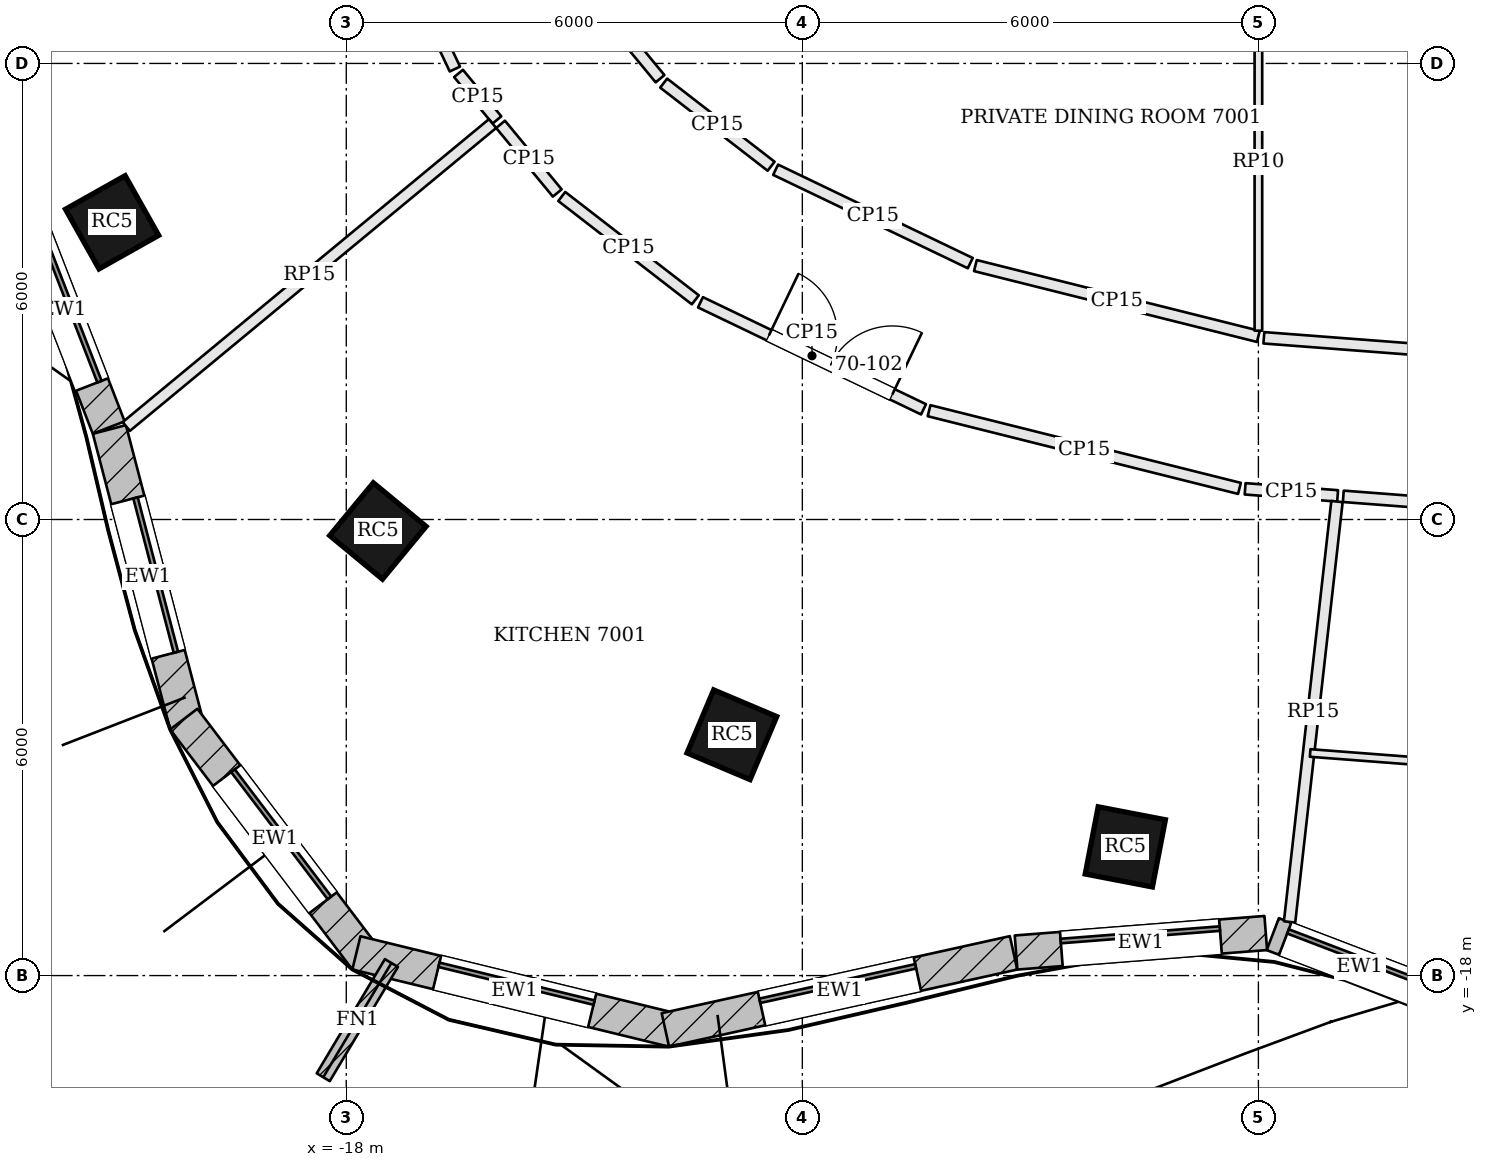
"""IFC4 building model, lengths in metres.
Left out: names, types, materials, properties, quantities, classifications, styles, units other than length and angle.
Written with IfcOpenShell. Run it as: python <this file> out.ifc"""

import sys

from ifc_helpers import new_model, si_unit, direction, frame, frame_2d, origin, origin_2d, place, context, subcontext, project, spatial, rectangle, extrude, element, fill, save


model = new_model("IFC4")
c1 = context("Model", 3, precision=1e-05, world=origin(), true_north=direction((0.0, 1.0)))
c2 = subcontext(c1, "Body", "Model", "MODEL_VIEW")
j1 = project(units=[si_unit("LENGTHUNIT", "METRE"), si_unit("PLANEANGLEUNIT", "RADIAN")], contexts=[c1])
p1 = place(None, origin())
s1 = spatial("IfcSite", under=j1, at=p1, CompositionType="ELEMENT")
p2 = place(p1, origin())
s2 = spatial("IfcBuilding", under=s1, at=p2, CompositionType="ELEMENT")
p3 = place(p2, frame((0.0, 0.0, 284.4)))
s3 = spatial("IfcBuildingStorey", under=s2, at=p3, CompositionType="ELEMENT", Elevation=284.4)
for number, where, z_axis, x_axis in (
    (1, (-21.081, -8.09, 0.0), (0.0, 0.0, 1.0), (0.49, -0.872, 0.0)),
    (2, (-17.584, -12.151, 0.0), (0.0, 0.0, 1.0), (0.771, -0.637, 0.0)),
    (3, (-12.927, -14.832, 0.0), (0.0, 0.0, 1.0), (0.921, -0.389, 0.0)),
    (4, (-7.751, -16.307, 0.0), (0.0, 0.0, 1.0), (0.982, -0.189, 0.0)),
):
    element("IfcColumn", number, at=place(p3, frame(where, z_axis=z_axis, x_axis=x_axis)), inside=s3, PredefinedType="COLUMN", context=c2, shape_type="SweptSolid", body=[
        extrude(rectangle(XDim=0.9, YDim=0.9, at=origin_2d()), origin(), (0.0, 0.0, 1.0), 3.9),
    ])
p4 = place(p3, frame((-22.323, -7.701, 0.0), z_axis=(0.0, 0.0, 1.0), x_axis=(0.361550075906, -0.932352692178, 0.0)))
e5 = element("IfcWall", 5, at=p4, inside=s3, PredefinedType="SOLIDWALL", context=c2, shape_type="SweptSolid", body=[
    extrude(rectangle(XDim=3.313, YDim=0.45, at=frame_2d((1.657, 0.0))), origin(), (0.0, 0.0, 1.0), 3.7),
])
p5 = place(p4, frame((0.607, 0.0, 0.9)))
e6 = element("IfcOpeningElement", 6, at=p5, cuts=e5, PredefinedType="OPENING", context=c2, shape_type="SweptSolid", body=[
    extrude(rectangle(XDim=2.1, YDim=2.3, at=frame_2d((1.05, 1.15))), frame((0.0, 0.235, 0.0), z_axis=(0.0, -1.0, 0.0), x_axis=(1.0, 0.0, 0.0)), (0.0, 0.0, 1.0), 0.47),
])
p6 = place(p3, frame((-21.117, -10.815, 0.0), z_axis=(0.0, 0.0, 1.0), x_axis=(0.253065392985, -0.967449175344, 0.0)))
e7 = element("IfcWall", 7, at=p6, inside=s3, PredefinedType="SOLIDWALL", context=c2, shape_type="SweptSolid", body=[
    extrude(rectangle(XDim=4.015, YDim=0.45, at=frame_2d((2.008, 0.0))), origin(), (0.0, 0.0, 1.0), 3.7),
])
p7 = place(p6, frame((0.958, 0.0, 0.9)))
e8 = element("IfcOpeningElement", 8, at=p7, cuts=e7, PredefinedType="OPENING", context=c2, shape_type="SweptSolid", body=[
    extrude(rectangle(XDim=2.1, YDim=2.3, at=frame_2d((1.05, 1.15))), frame((0.0, 0.235, 0.0), z_axis=(0.0, -1.0, 0.0), x_axis=(1.0, 0.0, 0.0)), (0.0, 0.0, 1.0), 0.47),
])
p8 = place(p3, frame((-20.138, -14.626, 0.0), z_axis=(0.0, 0.0, 1.0), x_axis=(0.604591324894, -0.796535830872, 0.0)))
e9 = element("IfcWall", 9, at=p8, inside=s3, PredefinedType="SOLIDWALL", context=c2, shape_type="SweptSolid", body=[
    extrude(rectangle(XDim=3.965, YDim=0.45, at=frame_2d((1.982, 0.0))), origin(), (0.0, 0.0, 1.0), 3.7),
])
p9 = place(p8, frame((0.932, 0.0, 0.9)))
e10 = element("IfcOpeningElement", 10, at=p9, cuts=e9, PredefinedType="OPENING", context=c2, shape_type="SweptSolid", body=[
    extrude(rectangle(XDim=2.1, YDim=2.3, at=frame_2d((1.05, 1.15))), frame((0.0, 0.235, 0.0), z_axis=(0.0, -1.0, 0.0), x_axis=(1.0, 0.0, 0.0)), (0.0, 0.0, 1.0), 0.47),
])
p10 = place(p3, frame((-17.867, -17.701, 0.0), z_axis=(0.0, 0.0, 1.0), x_axis=(0.971546885012, -0.236847314156, 0.0)))
e11 = element("IfcWall", 11, at=p10, inside=s3, PredefinedType="SOLIDWALL", context=c2, shape_type="SweptSolid", body=[
    extrude(rectangle(XDim=4.285, YDim=0.45, at=frame_2d((2.143, 0.0))), origin(), (0.0, 0.0, 1.0), 3.7),
])
p11 = place(p10, frame((1.093, 0.0, 0.9)))
e12 = element("IfcOpeningElement", 12, at=p11, cuts=e11, PredefinedType="OPENING", context=c2, shape_type="SweptSolid", body=[
    extrude(rectangle(XDim=2.1, YDim=2.3, at=frame_2d((1.05, 1.15))), frame((0.0, 0.235, 0.0), z_axis=(0.0, -1.0, 0.0), x_axis=(1.0, 0.0, 0.0)), (0.0, 0.0, 1.0), 0.47),
])
p12 = place(p3, frame((-13.802, -18.715, 0.0), z_axis=(0.0, 0.0, 1.0), x_axis=(0.976380129166, 0.216059814331, 0.0)))
e13 = element("IfcWall", 13, at=p12, inside=s3, PredefinedType="SOLIDWALL", context=c2, shape_type="SweptSolid", body=[
    extrude(rectangle(XDim=4.692, YDim=0.45, at=frame_2d((2.346, 0.0))), origin(), (0.0, 0.0, 1.0), 3.7),
])
p13 = place(p12, frame((1.296, 0.0, 0.9)))
e14 = element("IfcOpeningElement", 14, at=p13, cuts=e13, PredefinedType="OPENING", context=c2, shape_type="SweptSolid", body=[
    extrude(rectangle(XDim=2.1, YDim=2.3, at=frame_2d((1.05, 1.15))), frame((0.0, 0.235, 0.0), z_axis=(0.0, -1.0, 0.0), x_axis=(1.0, 0.0, 0.0)), (0.0, 0.0, 1.0), 0.47),
])
p14 = place(p3, frame((-9.188, -17.697, 0.0), z_axis=(0.0, 0.0, 1.0), x_axis=(0.996964028691, 0.077863505548, 0.0)))
e15 = element("IfcWall", 15, at=p14, inside=s3, PredefinedType="SOLIDWALL", context=c2, shape_type="SweptSolid", body=[
    extrude(rectangle(XDim=3.295, YDim=0.45, at=frame_2d((1.648, 0.0))), origin(), (0.0, 0.0, 1.0), 3.7),
])
p15 = place(p14, frame((0.598, 0.0, 0.9)))
e16 = element("IfcOpeningElement", 16, at=p15, cuts=e15, PredefinedType="OPENING", context=c2, shape_type="SweptSolid", body=[
    extrude(rectangle(XDim=2.1, YDim=2.3, at=frame_2d((1.05, 1.15))), frame((0.0, 0.235, 0.0), z_axis=(0.0, -1.0, 0.0), x_axis=(1.0, 0.0, 0.0)), (0.0, 0.0, 1.0), 0.47),
])
p16 = place(p3, frame((-5.811, -17.455, 0.0), z_axis=(0.0, 0.0, 1.0), x_axis=(0.934122271306, -0.35695319336, 0.0)))
e17 = element("IfcWall", 17, at=p16, inside=s3, PredefinedType="SOLIDWALL", context=c2, shape_type="SweptSolid", body=[
    extrude(rectangle(XDim=2.448, YDim=0.45, at=frame_2d((1.224, 0.0))), origin(), (0.0, 0.0, 1.0), 3.7),
])
p17 = place(p16, frame((0.174, 0.0, 0.9)))
e18 = element("IfcOpeningElement", 18, at=p17, cuts=e17, PredefinedType="OPENING", context=c2, shape_type="SweptSolid", body=[
    extrude(rectangle(XDim=2.1, YDim=2.3, at=frame_2d((1.05, 1.15))), frame((0.0, 0.235, 0.0), z_axis=(0.0, -1.0, 0.0), x_axis=(1.0, 0.0, 0.0)), (0.0, 0.0, 1.0), 0.47),
])
p18 = place(p3, frame((-17.406, -17.835, 0.0), z_axis=(0.0, 0.0, 1.0), x_axis=(-0.512648290506, -0.858598701514, 0.0)))
e19 = element("IfcWall", 19, at=p18, inside=s3, PredefinedType="SOLIDWALL", context=c2, shape_type="SweptSolid", body=[
    extrude(rectangle(XDim=1.75, YDim=0.2, at=frame_2d((0.875, 0.0))), origin(), (0.0, 0.0, 1.0), 3.7),
])
p19 = place(p3, frame((-17.425, -4.269, 0.0), z_axis=(0.0, 0.0, 1.0), x_axis=(0.427886578366, -0.90383243804, 0.0)))
e20 = element("IfcWall", 20, at=p19, inside=s3, PredefinedType="PARTITIONING", context=c2, shape_type="SweptSolid", body=[
    extrude(rectangle(XDim=1.996, YDim=0.15, at=frame_2d((0.998, 0.0))), origin(), (0.0, 0.0, 1.0), 3.198),
])
p20 = place(p3, frame((-16.523, -6.132, 0.0), z_axis=(0.0, 0.0, 1.0), x_axis=(0.636698606768, -0.771112757085, 0.0)))
e21 = element("IfcWall", 21, at=p20, inside=s3, PredefinedType="PARTITIONING", context=c2, shape_type="SweptSolid", body=[
    extrude(rectangle(XDim=0.794, YDim=0.15, at=frame_2d((0.397, 0.0))), origin(), (0.0, 0.0, 1.0), 3.198),
])
p21 = place(p3, frame((-20.894, -10.777, 0.0), z_axis=(0.0, 0.0, 1.0), x_axis=(0.770606553, 0.637311180251, 0.0)))
e22 = element("IfcWall", 22, at=p21, inside=s3, PredefinedType="PARTITIONING", context=c2, shape_type="SweptSolid", body=[
    extrude(rectangle(XDim=6.253, YDim=0.15, at=frame_2d((3.126, 0.0))), origin(), (0.0, 0.0, 1.0), 3.234),
])
p22 = place(p3, frame((-15.97, -6.802, 0.0), z_axis=(0.0, 0.0, 1.0), x_axis=(0.636897609689, -0.770948399552, 0.0)))
e23 = element("IfcWall", 23, at=p22, inside=s3, PredefinedType="PARTITIONING", context=c2, shape_type="SweptSolid", body=[
    extrude(rectangle(XDim=1.171, YDim=0.15, at=frame_2d((0.585, 0.0))), origin(), (0.0, 0.0, 1.0), 3.198),
])
p23 = place(p3, frame((-15.165, -7.75, 0.0), z_axis=(0.0, 0.0, 1.0), x_axis=(0.790917548929, -0.611922732701, 0.0)))
e24 = element("IfcWall", 24, at=p23, inside=s3, PredefinedType="PARTITIONING", context=c2, shape_type="SweptSolid", body=[
    extrude(rectangle(XDim=2.222, YDim=0.15, at=frame_2d((1.111, 0.0))), origin(), (0.0, 0.0, 1.0), 3.198),
])
p24 = place(p3, frame((-13.34, -9.142, 0.0), z_axis=(0.0, 0.0, 1.0), x_axis=(0.901599124721, -0.432572558425, 0.0)))
e25 = element("IfcWall", 25, at=p24, inside=s3, PredefinedType="PARTITIONING", context=c2, shape_type="SweptSolid", body=[
    extrude(rectangle(XDim=3.255, YDim=0.15, at=frame_2d((1.627, 0.0))), origin(), (0.0, 0.0, 1.0), 3.198),
])
p25 = place(p24, frame((1.0, 0.0, 0.0)))
e26 = element("IfcOpeningElement", 26, at=p25, cuts=e25, PredefinedType="OPENING", context=c2, shape_type="SweptSolid", body=[
    extrude(rectangle(XDim=1.8, YDim=2.1, at=frame_2d((0.9, 1.05))), frame((0.0, 0.085, 0.0), z_axis=(0.0, -1.0, 0.0), x_axis=(1.0, 0.0, 0.0)), (0.0, 0.0, 1.0), 0.17),
])
p26 = place(p3, frame((-10.333, -10.569, 0.0), z_axis=(0.0, 0.0, 1.0), x_axis=(0.970067398009, -0.242835836151, 0.0)))
e27 = element("IfcWall", 27, at=p26, inside=s3, PredefinedType="PARTITIONING", context=c2, shape_type="SweptSolid", body=[
    extrude(rectangle(XDim=4.209, YDim=0.15, at=frame_2d((2.105, 0.0))), origin(), (0.0, 0.0, 1.0), 3.198),
])
p27 = place(p3, frame((-6.175, -11.596, 0.0), z_axis=(0.0, 0.0, 1.0), x_axis=(0.997106038867, -0.076023333621, 0.0)))
e28 = element("IfcWall", 28, at=p27, inside=s3, PredefinedType="PARTITIONING", context=c2, shape_type="SweptSolid", body=[
    extrude(rectangle(XDim=1.22, YDim=0.15, at=frame_2d((0.61, 0.0))), origin(), (0.0, 0.0, 1.0), 3.198),
])
p28 = place(p3, frame((-5.59, -17.294, 0.0), z_axis=(0.0, 0.0, 1.0), x_axis=(0.112044411854, 0.993703200041, 0.0)))
e29 = element("IfcWall", 29, at=p28, inside=s3, PredefinedType="PARTITIONING", context=c2, shape_type="SweptSolid", body=[
    extrude(rectangle(XDim=5.565, YDim=0.15, at=frame_2d((2.783, 0.0))), origin(), (0.0, 0.0, 1.0), 3.234),
])
p29 = place(p3, frame((-4.883, -11.695, 0.0), z_axis=(0.0, 0.0, 1.0), x_axis=(0.997096936577, -0.076142623207, 0.0)))
e30 = element("IfcWall", 30, at=p29, inside=s3, PredefinedType="PARTITIONING", context=c2, shape_type="SweptSolid", body=[
    extrude(rectangle(XDim=3.944, YDim=0.15, at=frame_2d((1.972, 0.0))), origin(), (0.0, 0.0, 1.0), 3.198),
])
p30 = place(p29, frame((1.604, 0.0, 0.0)))
e31 = element("IfcOpeningElement", 31, at=p30, cuts=e30, PredefinedType="OPENING", context=c2, shape_type="SweptSolid", body=[
    extrude(rectangle(XDim=1.8, YDim=2.1, at=frame_2d((0.9, 1.05))), frame((0.0, 0.085, 0.0), z_axis=(0.0, -1.0, 0.0), x_axis=(1.0, 0.0, 0.0)), (0.0, 0.0, 1.0), 0.17),
])
p31 = place(p3, frame((-0.982, -9.987, 0.0), z_axis=(0.0, 0.0, 1.0), x_axis=(-0.997096607341, 0.07614693447, 0.0)))
e32 = element("IfcWall", 32, at=p31, inside=s3, PredefinedType="PARTITIONING", context=c2, shape_type="SweptSolid", body=[
    extrude(rectangle(XDim=4.96, YDim=0.15, at=frame_2d((2.48, 0.0))), origin(), (0.0, 0.0, 1.0), 3.198),
])
p32 = place(p3, frame((-6.001, -9.591, 0.0), z_axis=(0.0, 0.0, 1.0), x_axis=(-0.970063855769, 0.242849986061, 0.0)))
e33 = element("IfcWall", 33, at=p32, inside=s3, PredefinedType="PARTITIONING", context=c2, shape_type="SweptSolid", body=[
    extrude(rectangle(XDim=3.837, YDim=0.15, at=frame_2d((1.919, 0.0))), origin(), (0.0, 0.0, 1.0), 3.198),
])
p33 = place(p3, frame((-9.791, -8.627, 0.0), z_axis=(0.0, 0.0, 1.0), x_axis=(-0.901598165215, 0.432574558292, 0.0)))
e34 = element("IfcWall", 34, at=p33, inside=s3, PredefinedType="PARTITIONING", context=c2, shape_type="SweptSolid", body=[
    extrude(rectangle(XDim=2.84, YDim=0.15, at=frame_2d((1.42, 0.0))), origin(), (0.0, 0.0, 1.0), 3.198),
])
p34 = place(p3, frame((-12.411, -7.353, 0.0), z_axis=(0.0, 0.0, 1.0), x_axis=(-0.790894311556, 0.611952766109, 0.0)))
e35 = element("IfcWall", 35, at=p34, inside=s3, PredefinedType="PARTITIONING", context=c2, shape_type="SweptSolid", body=[
    extrude(rectangle(XDim=1.787, YDim=0.15, at=frame_2d((0.894, 0.0))), origin(), (0.0, 0.0, 1.0), 3.198),
])
p35 = place(p3, frame((-13.872, -6.201, 0.0), z_axis=(0.0, 0.0, 1.0), x_axis=(-0.636832838855, 0.771001903601, 0.0)))
e36 = element("IfcWall", 36, at=p35, inside=s3, PredefinedType="PARTITIONING", context=c2, shape_type="SweptSolid", body=[
    extrude(rectangle(XDim=1.558, YDim=0.15, at=frame_2d((0.779, 0.0))), origin(), (0.0, 0.0, 1.0), 3.198),
])
p36 = place(p3, frame((-1.073, -15.396, 0.0), z_axis=(0.0, 0.0, 1.0), x_axis=(-0.997093140471, 0.076192317369, 0.0)))
e37 = element("IfcWall", 37, at=p36, inside=s3, PredefinedType="PARTITIONING", context=c2, shape_type="SweptSolid", body=[
    extrude(rectangle(XDim=4.259, YDim=0.1, at=frame_2d((2.129, 0.0))), origin(), (0.0, 0.0, 1.0), 3.198),
])
p37 = place(p3, frame((-6.0, -9.516, 0.0), z_axis=(0.0, 0.0, 1.0), x_axis=(0.0, 1.0, 0.0)))
e38 = element("IfcWall", 38, at=p37, inside=s3, PredefinedType="PARTITIONING", context=c2, shape_type="SweptSolid", body=[
    extrude(rectangle(XDim=4.441, YDim=0.1, at=frame_2d((2.221, 0.0))), origin(), (0.0, 0.0, 1.0), 3.198),
])
p38 = place(p5, origin())
e39 = element("IfcWindow", 39, at=p38, inside=s3, PartitioningType="SINGLE_PANEL", PredefinedType="WINDOW", context=c2, shape_type="SweptSolid", body=[
    extrude(rectangle(XDim=2.1, YDim=2.3, at=frame_2d((1.05, 1.15))), frame((0.0, 0.135, 0.0), z_axis=(0.0, -1.0, 0.0), x_axis=(1.0, 0.0, 0.0)), (0.0, 0.0, 1.0), 0.06),
])
fill(e6, e39)
p39 = place(p7, origin())
e40 = element("IfcWindow", 40, at=p39, inside=s3, PartitioningType="SINGLE_PANEL", PredefinedType="WINDOW", context=c2, shape_type="SweptSolid", body=[
    extrude(rectangle(XDim=2.1, YDim=2.3, at=frame_2d((1.05, 1.15))), frame((0.0, 0.135, 0.0), z_axis=(0.0, -1.0, 0.0), x_axis=(1.0, 0.0, 0.0)), (0.0, 0.0, 1.0), 0.06),
])
fill(e8, e40)
p40 = place(p9, origin())
e41 = element("IfcWindow", 41, at=p40, inside=s3, PartitioningType="SINGLE_PANEL", PredefinedType="WINDOW", context=c2, shape_type="SweptSolid", body=[
    extrude(rectangle(XDim=2.1, YDim=2.3, at=frame_2d((1.05, 1.15))), frame((0.0, 0.135, 0.0), z_axis=(0.0, -1.0, 0.0), x_axis=(1.0, 0.0, 0.0)), (0.0, 0.0, 1.0), 0.06),
])
fill(e10, e41)
p41 = place(p11, origin())
e42 = element("IfcWindow", 42, at=p41, inside=s3, PartitioningType="SINGLE_PANEL", PredefinedType="WINDOW", context=c2, shape_type="SweptSolid", body=[
    extrude(rectangle(XDim=2.1, YDim=2.3, at=frame_2d((1.05, 1.15))), frame((0.0, 0.135, 0.0), z_axis=(0.0, -1.0, 0.0), x_axis=(1.0, 0.0, 0.0)), (0.0, 0.0, 1.0), 0.06),
])
fill(e12, e42)
p42 = place(p13, origin())
e43 = element("IfcWindow", 43, at=p42, inside=s3, PartitioningType="SINGLE_PANEL", PredefinedType="WINDOW", context=c2, shape_type="SweptSolid", body=[
    extrude(rectangle(XDim=2.1, YDim=2.3, at=frame_2d((1.05, 1.15))), frame((0.0, 0.135, 0.0), z_axis=(0.0, -1.0, 0.0), x_axis=(1.0, 0.0, 0.0)), (0.0, 0.0, 1.0), 0.06),
])
fill(e14, e43)
p43 = place(p15, origin())
e44 = element("IfcWindow", 44, at=p43, inside=s3, PartitioningType="SINGLE_PANEL", PredefinedType="WINDOW", context=c2, shape_type="SweptSolid", body=[
    extrude(rectangle(XDim=2.1, YDim=2.3, at=frame_2d((1.05, 1.15))), frame((0.0, 0.135, 0.0), z_axis=(0.0, -1.0, 0.0), x_axis=(1.0, 0.0, 0.0)), (0.0, 0.0, 1.0), 0.06),
])
fill(e16, e44)
p44 = place(p17, origin())
e45 = element("IfcWindow", 45, at=p44, inside=s3, PartitioningType="SINGLE_PANEL", PredefinedType="WINDOW", context=c2, shape_type="SweptSolid", body=[
    extrude(rectangle(XDim=2.1, YDim=2.3, at=frame_2d((1.05, 1.15))), frame((0.0, 0.135, 0.0), z_axis=(0.0, -1.0, 0.0), x_axis=(1.0, 0.0, 0.0)), (0.0, 0.0, 1.0), 0.06),
])
fill(e18, e45)
p45 = place(p25, origin())
e46 = element("IfcDoor", 46, at=p45, inside=s3, OperationType="DOUBLE_DOOR_SINGLE_SWING", PredefinedType="DOOR", context=c2, shape_type="SweptSolid", body=[
    extrude(rectangle(XDim=1.8, YDim=2.1, at=frame_2d((0.9, 1.05))), frame((0.0, 0.025, 0.0), z_axis=(0.0, -1.0, 0.0), x_axis=(1.0, 0.0, 0.0)), (0.0, 0.0, 1.0), 0.05),
])
fill(e26, e46)
save(model, sys.argv[1])
